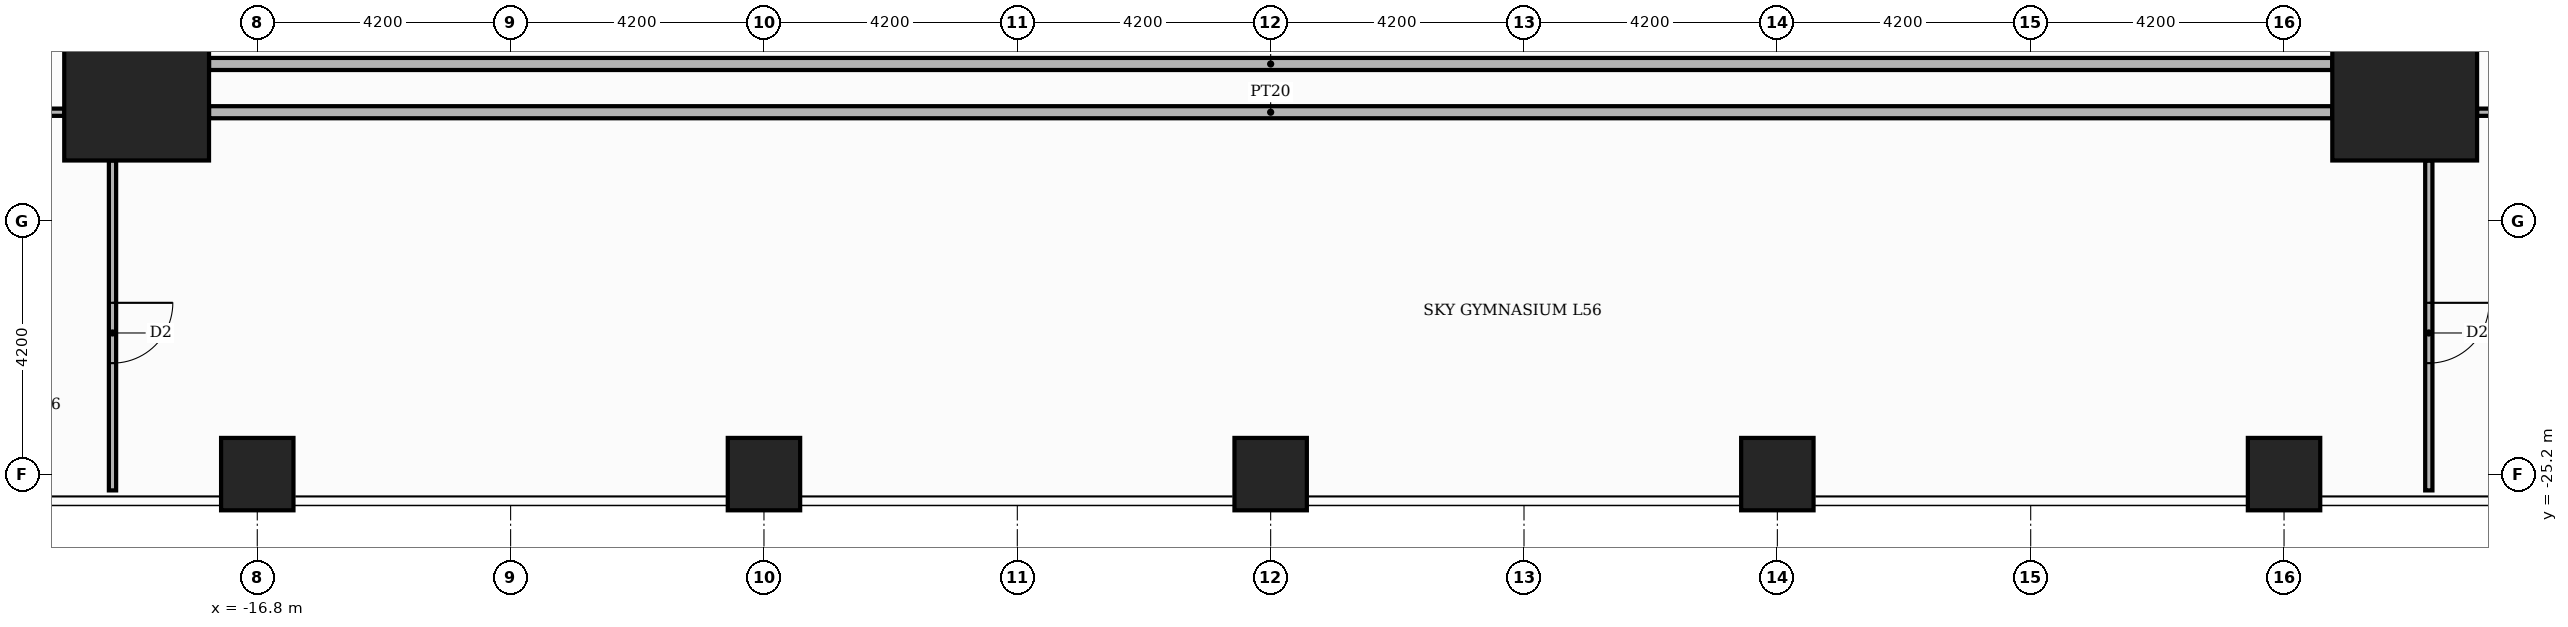
"""IFC4 building model, lengths in metres.
Left out: names, types, materials, properties, quantities, classifications, styles, units other than length and angle.
Written with IfcOpenShell. Run it as: python <this file> out.ifc"""

import sys

from ifc_helpers import new_model, si_unit, direction, frame, frame_2d, origin, origin_2d, place, context, subcontext, project, spatial, rectangle, extrude, element, fill, save


model = new_model("IFC4")
c1 = context("Model", 3, precision=1e-05, world=origin(), true_north=direction((0.0, 1.0)))
c2 = subcontext(c1, "Body", "Model", "MODEL_VIEW")
j1 = project(units=[si_unit("LENGTHUNIT", "METRE"), si_unit("PLANEANGLEUNIT", "RADIAN")], contexts=[c1])
p1 = place(None, origin())
s1 = spatial("IfcSite", under=j1, at=p1, CompositionType="ELEMENT")
p2 = place(p1, origin())
s2 = spatial("IfcBuilding", under=s1, at=p2, CompositionType="ELEMENT")
p3 = place(p2, frame((0.0, 0.0, 235.2)))
s3 = spatial("IfcBuildingStorey", under=s2, at=p3, CompositionType="ELEMENT", Elevation=235.2)
for number, where, z_axis, x_axis in (
    (1, (18.8, -18.8, 0.0), (0.0, 0.0, 1.0), (1.0, 0.0, 0.0)),
    (2, (-18.8, -18.8, 0.0), (0.0, 0.0, 1.0), (1.0, 0.0, 0.0)),
):
    element("IfcColumn", number, at=place(p3, frame(where, z_axis=z_axis, x_axis=x_axis)), inside=s3, PredefinedType="COLUMN", context=c2, shape_type="SweptSolid", body=[
        extrude(rectangle(XDim=2.4, YDim=2.4, at=origin_2d()), origin(), (0.0, 0.0, 1.0), 5.4),
    ])
for number, where, z_axis, x_axis in (
    (3, (0.0, -25.2, 0.0), (0.0, 0.0, 1.0), (1.0, 0.0, 0.0)),
    (4, (8.4, -25.2, 0.0), (0.0, 0.0, 1.0), (1.0, 0.0, 0.0)),
    (5, (16.8, -25.2, 0.0), (0.0, 0.0, 1.0), (1.0, 0.0, 0.0)),
    (6, (-8.4, -25.2, 0.0), (0.0, 0.0, 1.0), (1.0, 0.0, 0.0)),
    (7, (-16.8, -25.2, 0.0), (0.0, 0.0, 1.0), (1.0, 0.0, 0.0)),
):
    element("IfcColumn", number, at=place(p3, frame(where, z_axis=z_axis, x_axis=x_axis)), inside=s3, PredefinedType="COLUMN", context=c2, shape_type="SweptSolid", body=[
        extrude(rectangle(XDim=1.2, YDim=1.2, at=origin_2d()), origin(), (0.0, 0.0, 1.0), 5.4),
    ])
p4 = place(p3, frame((-19.2, -25.47, 0.0), z_axis=(0.0, 0.0, 1.0), x_axis=(0.0, 1.0, 0.0)))
e8 = element("IfcWall", 8, at=p4, inside=s3, PredefinedType="PARTITIONING", context=c2, shape_type="SweptSolid", body=[
    extrude(rectangle(XDim=5.47, YDim=0.12, at=frame_2d((2.735, 0.0))), origin(), (0.0, 0.0, 1.0), 4.98),
])
p5 = place(p4, frame((2.11, 0.0, 0.0)))
e9 = element("IfcOpeningElement", 9, at=p5, cuts=e8, PredefinedType="OPENING", context=c2, shape_type="SweptSolid", body=[
    extrude(rectangle(XDim=1.0, YDim=2.1, at=frame_2d((0.5, 1.05))), frame((0.0, 0.07, 0.0), z_axis=(0.0, -1.0, 0.0), x_axis=(1.0, 0.0, 0.0)), (0.0, 0.0, 1.0), 0.14),
])
p6 = place(p3, frame((19.2, -25.47, 0.0), z_axis=(0.0, 0.0, 1.0), x_axis=(0.0, 1.0, 0.0)))
e10 = element("IfcWall", 10, at=p6, inside=s3, PredefinedType="PARTITIONING", context=c2, shape_type="SweptSolid", body=[
    extrude(rectangle(XDim=5.47, YDim=0.12, at=frame_2d((2.735, 0.0))), origin(), (0.0, 0.0, 1.0), 4.98),
])
p7 = place(p6, frame((2.11, 0.0, 0.0)))
e11 = element("IfcOpeningElement", 11, at=p7, cuts=e10, PredefinedType="OPENING", context=c2, shape_type="SweptSolid", body=[
    extrude(rectangle(XDim=1.0, YDim=2.1, at=frame_2d((0.5, 1.05))), frame((0.0, 0.07, 0.0), z_axis=(0.0, -1.0, 0.0), x_axis=(1.0, 0.0, 0.0)), (0.0, 0.0, 1.0), 0.14),
])
p8 = place(p3, frame((-25.47, -19.2, 0.0), z_axis=(0.0, 0.0, 1.0), x_axis=(1.0, 0.0, 0.0)))
e12 = element("IfcWall", 12, at=p8, inside=s3, PredefinedType="PARTITIONING", context=c2, shape_type="SweptSolid", body=[
    extrude(rectangle(XDim=5.47, YDim=0.12, at=frame_2d((2.735, 0.0))), origin(), (0.0, 0.0, 1.0), 4.98),
])
p9 = place(p8, frame((2.11, 0.0, 0.0)))
e13 = element("IfcOpeningElement", 13, at=p9, cuts=e12, PredefinedType="OPENING", context=c2, shape_type="SweptSolid", body=[
    extrude(rectangle(XDim=1.0, YDim=2.1, at=frame_2d((0.5, 1.05))), frame((0.0, 0.07, 0.0), z_axis=(0.0, -1.0, 0.0), x_axis=(1.0, 0.0, 0.0)), (0.0, 0.0, 1.0), 0.14),
])
p10 = place(p3, frame((-17.6, -19.2, 0.0), z_axis=(0.0, 0.0, 1.0), x_axis=(1.0, 0.0, 0.0)))
e14 = element("IfcWall", 14, at=p10, inside=s3, PredefinedType="PARTITIONING", context=c2, shape_type="SweptSolid", body=[
    extrude(rectangle(XDim=35.2, YDim=0.2, at=frame_2d((17.6, 0.0))), origin(), (0.0, 0.0, 1.0), 4.98),
])
p11 = place(p3, frame((20.0, -19.2, 0.0), z_axis=(0.0, 0.0, 1.0), x_axis=(1.0, 0.0, 0.0)))
e15 = element("IfcWall", 15, at=p11, inside=s3, PredefinedType="PARTITIONING", context=c2, shape_type="SweptSolid", body=[
    extrude(rectangle(XDim=5.47, YDim=0.12, at=frame_2d((2.735, 0.0))), origin(), (0.0, 0.0, 1.0), 4.98),
])
p12 = place(p11, frame((2.36, 0.0, 0.0)))
e16 = element("IfcOpeningElement", 16, at=p12, cuts=e15, PredefinedType="OPENING", context=c2, shape_type="SweptSolid", body=[
    extrude(rectangle(XDim=1.0, YDim=2.1, at=frame_2d((0.5, 1.05))), frame((0.0, 0.07, 0.0), z_axis=(0.0, -1.0, 0.0), x_axis=(1.0, 0.0, 0.0)), (0.0, 0.0, 1.0), 0.14),
])
p13 = place(p3, frame((-17.6, -18.4, 0.0), z_axis=(0.0, 0.0, 1.0), x_axis=(1.0, 0.0, 0.0)))
e17 = element("IfcWall", 17, at=p13, inside=s3, PredefinedType="PARTITIONING", context=c2, shape_type="SweptSolid", body=[
    extrude(rectangle(XDim=35.2, YDim=0.2, at=frame_2d((17.6, 0.0))), origin(), (0.0, 0.0, 1.0), 4.98),
])
p14 = place(p5, frame((1.0, 0.0, 0.0), z_axis=(0.0, 0.0, 1.0), x_axis=(-1.0, 0.0, 0.0)))
e18 = element("IfcDoor", 18, at=p14, inside=s3, OperationType="SINGLE_SWING_RIGHT", PredefinedType="DOOR", context=c2, shape_type="SweptSolid", body=[
    extrude(rectangle(XDim=1.0, YDim=2.1, at=frame_2d((0.5, 1.05))), frame((0.0, 0.025, 0.0), z_axis=(0.0, -1.0, 0.0), x_axis=(1.0, 0.0, 0.0)), (0.0, 0.0, 1.0), 0.05),
])
fill(e9, e18)
p15 = place(p7, frame((1.0, 0.0, 0.0), z_axis=(0.0, 0.0, 1.0), x_axis=(-1.0, 0.0, 0.0)))
e19 = element("IfcDoor", 19, at=p15, inside=s3, OperationType="SINGLE_SWING_RIGHT", PredefinedType="DOOR", context=c2, shape_type="SweptSolid", body=[
    extrude(rectangle(XDim=1.0, YDim=2.1, at=frame_2d((0.5, 1.05))), frame((0.0, 0.025, 0.0), z_axis=(0.0, -1.0, 0.0), x_axis=(1.0, 0.0, 0.0)), (0.0, 0.0, 1.0), 0.05),
])
fill(e11, e19)
save(model, sys.argv[1])
